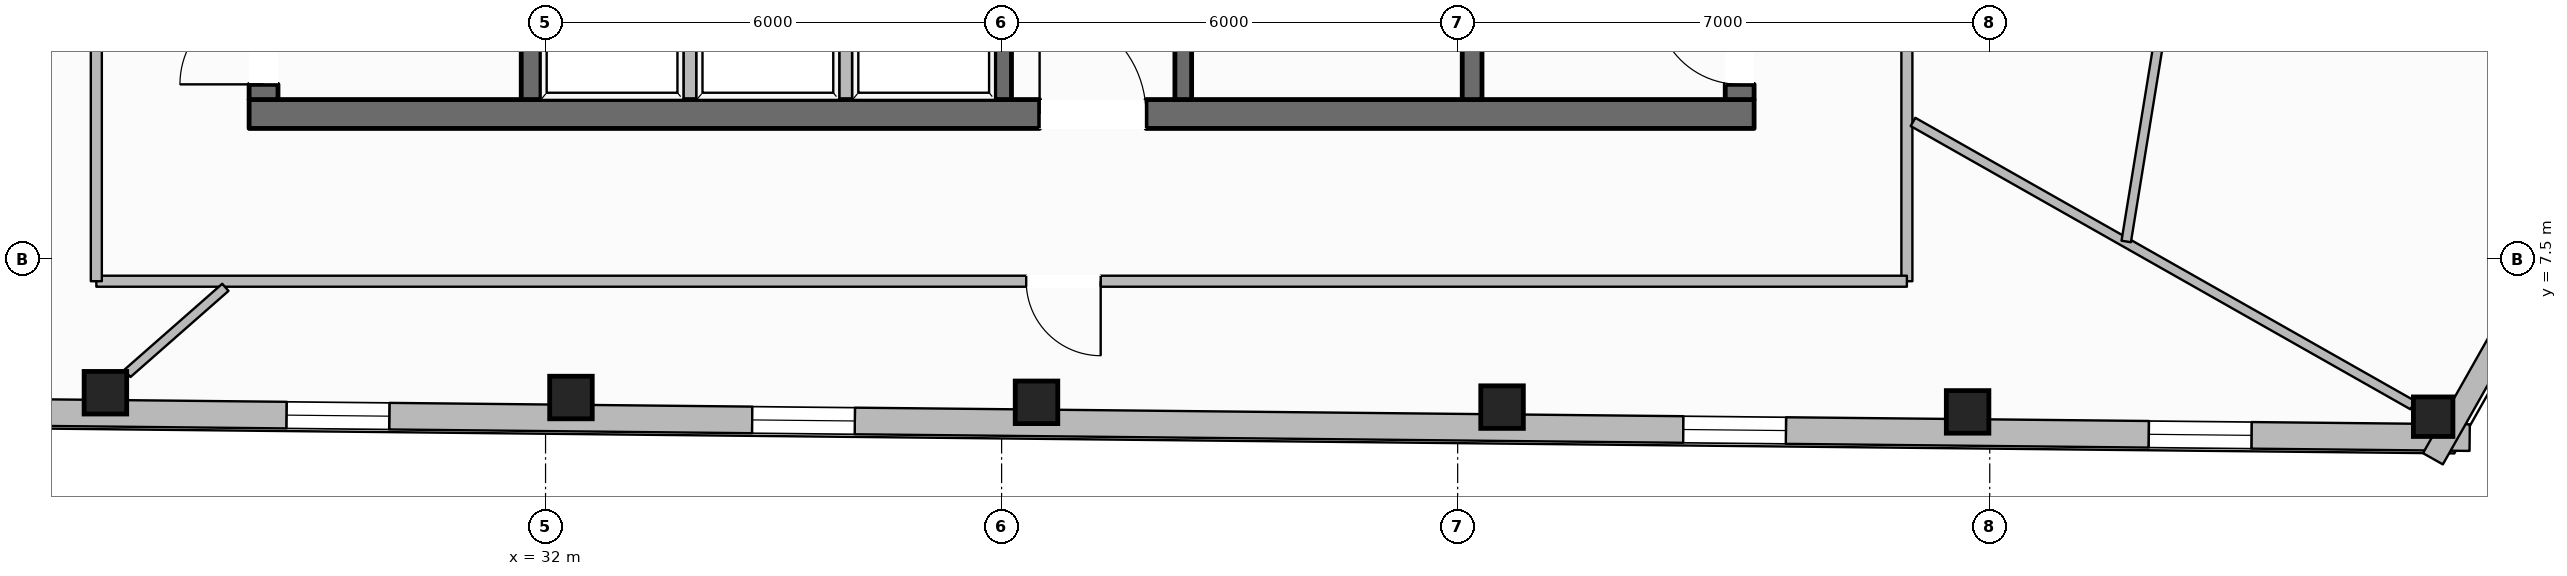
"""IFC4 building model, lengths in metres.
Left out: names, types, materials, properties, quantities, classifications, styles, units other than length and angle.
Written with IfcOpenShell. Run it as: python <this file> out.ifc"""

import sys

from ifc_helpers import new_model, si_unit, direction, frame, frame_2d, origin, origin_2d, place, context, subcontext, project, spatial, rectangle, hollow_rectangle, extrude, element, fill, save


model = new_model("IFC4")
c1 = context("Model", 3, precision=1e-05, world=origin(), true_north=direction((0.0, 1.0)))
c2 = subcontext(c1, "Body", "Model", "MODEL_VIEW")
j1 = project(units=[si_unit("LENGTHUNIT", "METRE"), si_unit("PLANEANGLEUNIT", "RADIAN")], contexts=[c1])
p1 = place(None, origin())
s1 = spatial("IfcSite", under=j1, at=p1, CompositionType="ELEMENT")
p2 = place(p1, origin())
s2 = spatial("IfcBuilding", under=s1, at=p2, CompositionType="ELEMENT")
p3 = place(p2, frame((0.0, 0.0, 247.2)))
s3 = spatial("IfcBuildingStorey", under=s2, at=p3, CompositionType="ELEMENT", Elevation=247.2)
p4 = place(p3, frame((28.1, 9.41, 0.0), z_axis=(0.0, 0.0, 1.0), x_axis=(1.0, 0.0, 0.0)))
e1 = element("IfcWall", 1, at=p4, inside=s3, PredefinedType="SOLIDWALL", context=c2, shape_type="SweptSolid", body=[
    extrude(rectangle(XDim=19.8, YDim=0.38, at=frame_2d((9.9, 0.0))), origin(), (0.0, 0.0, 1.0), 3.61),
])
p5 = place(p4, frame((10.4, 0.0, 0.0)))
e2 = element("IfcOpeningElement", 2, at=p5, cuts=e1, PredefinedType="OPENING", context=c2, shape_type="SweptSolid", body=[
    extrude(rectangle(XDim=1.4, YDim=2.2, at=frame_2d((0.7, 1.1))), frame((0.0, 0.2, 0.0), z_axis=(0.0, -1.0, 0.0), x_axis=(1.0, 0.0, 0.0)), (0.0, 0.0, 1.0), 0.4),
])
p6 = place(p3, frame((28.29, 9.6, 0.0), z_axis=(0.0, 0.0, 1.0), x_axis=(0.0, 1.0, 0.0)))
e3 = element("IfcWall", 3, at=p6, inside=s3, PredefinedType="SOLIDWALL", context=c2, shape_type="SweptSolid", body=[
    extrude(rectangle(XDim=13.0, YDim=0.38, at=frame_2d((6.5, 0.0))), origin(), (0.0, 0.0, 1.0), 3.61),
])
p7 = place(p6, frame((0.2, 0.0, 0.0)))
e4 = element("IfcOpeningElement", 4, at=p7, cuts=e3, PredefinedType="OPENING", context=c2, shape_type="SweptSolid", body=[
    extrude(rectangle(XDim=1.1, YDim=2.15, at=frame_2d((0.55, 1.075))), frame((0.0, 0.2, 0.0), z_axis=(0.0, -1.0, 0.0), x_axis=(1.0, 0.0, 0.0)), (0.0, 0.0, 1.0), 0.4),
])
p8 = place(p6, frame((8.4, 0.0, 0.0)))
e5 = element("IfcOpeningElement", 5, at=p8, cuts=e3, PredefinedType="OPENING", context=c2, shape_type="SweptSolid", body=[
    extrude(rectangle(XDim=0.9, YDim=2.1, at=frame_2d((0.45, 1.05))), frame((0.0, 0.2, 0.0), z_axis=(0.0, -1.0, 0.0), x_axis=(1.0, 0.0, 0.0)), (0.0, 0.0, 1.0), 0.4),
])
p9 = place(p3, frame((47.71, 9.6, 0.0), z_axis=(0.0, 0.0, 1.0), x_axis=(0.0, 1.0, 0.0)))
e6 = element("IfcWall", 6, at=p9, inside=s3, PredefinedType="SOLIDWALL", context=c2, shape_type="SweptSolid", body=[
    extrude(rectangle(XDim=13.0, YDim=0.38, at=frame_2d((6.5, 0.0))), origin(), (0.0, 0.0, 1.0), 3.61),
])
p10 = place(p9, frame((0.2, 0.0, 0.0)))
e7 = element("IfcOpeningElement", 7, at=p10, cuts=e6, PredefinedType="OPENING", context=c2, shape_type="SweptSolid", body=[
    extrude(rectangle(XDim=1.1, YDim=2.15, at=frame_2d((0.55, 1.075))), frame((0.0, 0.2, 0.0), z_axis=(0.0, -1.0, 0.0), x_axis=(1.0, 0.0, 0.0)), (0.0, 0.0, 1.0), 0.4),
])
p11 = place(p9, frame((8.4, 0.0, 0.0)))
e8 = element("IfcOpeningElement", 8, at=p11, cuts=e6, PredefinedType="OPENING", context=c2, shape_type="SweptSolid", body=[
    extrude(rectangle(XDim=0.9, YDim=2.1, at=frame_2d((0.45, 1.05))), frame((0.0, 0.2, 0.0), z_axis=(0.0, -1.0, 0.0), x_axis=(1.0, 0.0, 0.0)), (0.0, 0.0, 1.0), 0.4),
])
p12 = place(p3, frame((31.81, 9.6, 0.0), z_axis=(0.0, 0.0, 1.0), x_axis=(0.0, 1.0, 0.0)))
e9 = element("IfcWall", 9, at=p12, inside=s3, PredefinedType="SHEAR", context=c2, shape_type="SweptSolid", body=[
    extrude(rectangle(XDim=13.0, YDim=0.26, at=frame_2d((6.5, 0.0))), origin(), (0.0, 0.0, 1.0), 3.61),
])
p13 = place(p12, frame((10.925, 0.0, 0.0)))
e10 = element("IfcOpeningElement", 10, at=p13, cuts=e9, PredefinedType="OPENING", context=c2, shape_type="SweptSolid", body=[
    extrude(rectangle(XDim=1.25, YDim=2.25, at=frame_2d((0.625, 1.125))), frame((0.0, 0.14, 0.0), z_axis=(0.0, -1.0, 0.0), x_axis=(1.0, 0.0, 0.0)), (0.0, 0.0, 1.0), 0.28),
])
p14 = place(p3, frame((44.19, 9.6, 0.0), z_axis=(0.0, 0.0, 1.0), x_axis=(0.0, 1.0, 0.0)))
e11 = element("IfcWall", 11, at=p14, inside=s3, PredefinedType="SHEAR", context=c2, shape_type="SweptSolid", body=[
    extrude(rectangle(XDim=13.0, YDim=0.26, at=frame_2d((6.5, 0.0))), origin(), (0.0, 0.0, 1.0), 3.61),
])
p15 = place(p14, frame((10.925, 0.0, 0.0)))
e12 = element("IfcOpeningElement", 12, at=p15, cuts=e11, PredefinedType="OPENING", context=c2, shape_type="SweptSolid", body=[
    extrude(rectangle(XDim=1.25, YDim=2.25, at=frame_2d((0.625, 1.125))), frame((0.0, 0.14, 0.0), z_axis=(0.0, -1.0, 0.0), x_axis=(1.0, 0.0, 0.0)), (0.0, 0.0, 1.0), 0.28),
])
for number, where, z_axis, x_axis in (
    (13, (38.02, 9.6, 0.0), (0.0, 0.0, 1.0), (0.0, 1.0, 0.0)),
    (14, (40.39, 9.6, 0.0), (0.0, 0.0, 1.0), (0.0, 1.0, 0.0)),
):
    element("IfcWall", number, at=place(p3, frame(where, z_axis=z_axis, x_axis=x_axis)), inside=s3, PredefinedType="SOLIDWALL", context=c2, shape_type="SweptSolid", body=[
        extrude(rectangle(XDim=2.24, YDim=0.22, at=frame_2d((1.12, 0.0))), origin(), (0.0, 0.0, 1.0), 3.61),
    ])
for number, where, z_axis, x_axis in (
    (15, (26.209, 5.743, 0.0), (0.0, 0.0, 1.0), (1.0, 0.0, 0.0)),
    (16, (32.334, 5.68, 0.0), (0.0, 0.0, 1.0), (1.0, 0.0, 0.0)),
    (17, (38.459, 5.617, 0.0), (0.0, 0.0, 1.0), (1.0, 0.0, 0.0)),
    (18, (44.584, 5.554, 0.0), (0.0, 0.0, 1.0), (1.0, 0.0, 0.0)),
    (19, (50.709, 5.491, 0.0), (0.0, 0.0, 1.0), (1.0, 0.0, 0.0)),
):
    element("IfcColumn", number, at=place(p3, frame(where, z_axis=z_axis, x_axis=x_axis)), inside=s3, PredefinedType="COLUMN", context=c2, shape_type="SweptSolid", body=[
        extrude(hollow_rectangle(XDim=0.56, YDim=0.56, WallThickness=0.025, at=origin_2d()), origin(), (0.0, 0.0, 1.0), 3.61),
    ])
p16 = place(p3, frame((56.833, 5.428, 0.0), z_axis=(0.0, 0.0, 1.0), x_axis=(1.0, 0.0, 0.0)))
e20 = element("IfcColumn", 20, at=p16, inside=s3, PredefinedType="COLUMN", context=c2, shape_type="SweptSolid", body=[
    extrude(hollow_rectangle(XDim=0.52, YDim=0.52, WallThickness=0.024, at=origin_2d()), origin(), (0.0, 0.0, 1.0), 3.61),
])
p17 = place(p3, frame((57.314, 5.153, 0.0), z_axis=(0.0, 0.0, 1.0), x_axis=(-0.999946942722, 0.010301055321, 0.0)))
e21 = element("IfcWall", 21, at=p17, inside=s3, PredefinedType="STANDARD", context=c2, shape_type="SweptSolid", body=[
    extrude(rectangle(XDim=37.708, YDim=0.35, at=frame_2d((18.854, 0.0))), origin(), (0.0, 0.0, 1.0), 3.196),
])
p18 = place(p17, frame((33.497, 0.0, 0.65)))
e22 = element("IfcOpeningElement", 22, at=p18, cuts=e21, PredefinedType="OPENING", context=c2, shape_type="SweptSolid", body=[
    extrude(rectangle(XDim=1.35, YDim=1.75, at=frame_2d((0.675, 0.875))), frame((0.0, 0.185, 0.0), z_axis=(0.0, -1.0, 0.0), x_axis=(1.0, 0.0, 0.0)), (0.0, 0.0, 1.0), 0.37),
])
p19 = place(p17, frame((27.372, 0.0, 0.65)))
e23 = element("IfcOpeningElement", 23, at=p19, cuts=e21, PredefinedType="OPENING", context=c2, shape_type="SweptSolid", body=[
    extrude(rectangle(XDim=1.35, YDim=1.75, at=frame_2d((0.675, 0.875))), frame((0.0, 0.185, 0.0), z_axis=(0.0, -1.0, 0.0), x_axis=(1.0, 0.0, 0.0)), (0.0, 0.0, 1.0), 0.37),
])
p20 = place(p17, frame((21.246, 0.0, 0.65)))
e24 = element("IfcOpeningElement", 24, at=p20, cuts=e21, PredefinedType="OPENING", context=c2, shape_type="SweptSolid", body=[
    extrude(rectangle(XDim=1.35, YDim=1.75, at=frame_2d((0.675, 0.875))), frame((0.0, 0.185, 0.0), z_axis=(0.0, -1.0, 0.0), x_axis=(1.0, 0.0, 0.0)), (0.0, 0.0, 1.0), 0.37),
])
p21 = place(p17, frame((8.996, 0.0, 0.65)))
e25 = element("IfcOpeningElement", 25, at=p21, cuts=e21, PredefinedType="OPENING", context=c2, shape_type="SweptSolid", body=[
    extrude(rectangle(XDim=1.35, YDim=1.75, at=frame_2d((0.675, 0.875))), frame((0.0, 0.185, 0.0), z_axis=(0.0, -1.0, 0.0), x_axis=(1.0, 0.0, 0.0)), (0.0, 0.0, 1.0), 0.37),
])
p22 = place(p17, frame((2.871, 0.0, 0.65)))
e26 = element("IfcOpeningElement", 26, at=p22, cuts=e21, PredefinedType="OPENING", context=c2, shape_type="SweptSolid", body=[
    extrude(rectangle(XDim=1.35, YDim=1.75, at=frame_2d((0.675, 0.875))), frame((0.0, 0.185, 0.0), z_axis=(0.0, -1.0, 0.0), x_axis=(1.0, 0.0, 0.0)), (0.0, 0.0, 1.0), 0.37),
])
p23 = place(p3, frame((60.51, 11.379, 0.0), z_axis=(0.0, 0.0, 1.0), x_axis=(-0.492274685031, -0.870439908597, 0.0)))
e27 = element("IfcWall", 27, at=p23, inside=s3, PredefinedType="STANDARD", context=c2, shape_type="SweptSolid", body=[
    extrude(rectangle(XDim=7.473, YDim=0.3, at=frame_2d((3.737, 0.0))), origin(), (0.0, 0.0, 1.0), 3.196),
])
p24 = place(p23, frame((3.212, 0.0, 0.65)))
e28 = element("IfcOpeningElement", 28, at=p24, cuts=e27, PredefinedType="OPENING", context=c2, shape_type="SweptSolid", body=[
    extrude(rectangle(XDim=1.05, YDim=1.7, at=frame_2d((0.525, 0.85))), frame((0.0, 0.16, 0.0), z_axis=(0.0, -1.0, 0.0), x_axis=(1.0, 0.0, 0.0)), (0.0, 0.0, 1.0), 0.32),
])
for number, where, z_axis, x_axis in (
    (29, (33.9, 9.49, 0.0), (0.0, 0.0, 1.0), (0.0, 1.0, 0.0)),
    (30, (35.95, 9.49, 0.0), (0.0, 0.0, 1.0), (0.0, 1.0, 0.0)),
):
    element("IfcWall", number, at=place(p3, frame(where, z_axis=z_axis, x_axis=x_axis)), inside=s3, PredefinedType="PARTITIONING", context=c2, shape_type="SweptSolid", body=[
        extrude(rectangle(XDim=2.35, YDim=0.165, at=frame_2d((1.175, 0.0))), origin(), (0.0, 0.0, 1.0), 3.61),
    ])
p25 = place(p3, frame((49.91, 12.15, 0.0), z_axis=(0.0, 0.0, 1.0), x_axis=(0.0, -1.0, 0.0)))
e31 = element("IfcWall", 31, at=p25, inside=s3, PredefinedType="PARTITIONING", context=c2, shape_type="SweptSolid", body=[
    extrude(rectangle(XDim=4.94, YDim=0.145, at=frame_2d((2.47, 0.0))), origin(), (0.0, 0.0, 1.0), 3.61),
])
p26 = place(p3, frame((49.91, 7.21, 0.0), z_axis=(0.0, 0.0, 1.0), x_axis=(-1.0, 0.0, 0.0)))
e32 = element("IfcWall", 32, at=p26, inside=s3, PredefinedType="PARTITIONING", context=c2, shape_type="SweptSolid", body=[
    extrude(rectangle(XDim=23.82, YDim=0.145, at=frame_2d((11.91, 0.0))), origin(), (0.0, 0.0, 1.0), 3.61),
])
p27 = place(p26, frame((10.606, 0.0, 0.0)))
e33 = element("IfcOpeningElement", 33, at=p27, cuts=e32, PredefinedType="OPENING", context=c2, shape_type="SweptSolid", body=[
    extrude(rectangle(XDim=0.98, YDim=2.15, at=frame_2d((0.49, 1.075))), frame((0.0, 0.083, 0.0), z_axis=(0.0, -1.0, 0.0), x_axis=(1.0, 0.0, 0.0)), (0.0, 0.0, 1.0), 0.165),
])
p28 = place(p3, frame((26.09, 7.21, 0.0), z_axis=(0.0, 0.0, 1.0), x_axis=(0.0, 1.0, 0.0)))
e34 = element("IfcWall", 34, at=p28, inside=s3, PredefinedType="PARTITIONING", context=c2, shape_type="SweptSolid", body=[
    extrude(rectangle(XDim=17.78, YDim=0.145, at=frame_2d((8.89, 0.0))), origin(), (0.0, 0.0, 1.0), 3.349),
])
p29 = place(p28, frame((5.549, 0.0, 0.0)))
e35 = element("IfcOpeningElement", 35, at=p29, cuts=e34, PredefinedType="OPENING", context=c2, shape_type="SweptSolid", body=[
    extrude(rectangle(XDim=1.4, YDim=2.2, at=frame_2d((0.7, 1.1))), frame((0.0, 0.083, 0.0), z_axis=(0.0, -1.0, 0.0), x_axis=(1.0, 0.0, 0.0)), (0.0, 0.0, 1.0), 0.165),
])
p30 = place(p3, frame((27.788, 7.129, 0.0), z_axis=(0.0, 0.0, 1.0), x_axis=(-0.751333628503, -0.659922555063, 0.0)))
e36 = element("IfcWall", 36, at=p30, inside=s3, PredefinedType="PARTITIONING", context=c2, shape_type="SweptSolid", body=[
    extrude(rectangle(XDim=1.717, YDim=0.125, at=frame_2d((0.859, 0.0))), origin(), (0.0, 0.0, 1.0), 3.61),
])
p31 = place(p3, frame((49.99, 9.305, 0.0), z_axis=(0.0, 0.0, 1.0), x_axis=(0.870028652136, -0.49300116071, 0.0)))
e37 = element("IfcWall", 37, at=p31, inside=s3, PredefinedType="PARTITIONING", context=c2, shape_type="SweptSolid", body=[
    extrude(rectangle(XDim=7.557, YDim=0.125, at=frame_2d((3.779, 0.0))), origin(), (0.0, 0.0, 1.0), 3.246),
])
p32 = place(p3, frame((52.796, 7.733, 0.0), z_axis=(0.0, 0.0, 1.0), x_axis=(0.160388372881, 0.987053985274, 0.0)))
e38 = element("IfcWall", 38, at=p32, inside=s3, PredefinedType="PARTITIONING", context=c2, shape_type="SweptSolid", body=[
    extrude(rectangle(XDim=12.748, YDim=0.125, at=frame_2d((6.374, 0.0))), origin(), (0.0, 0.0, 1.0), 3.349),
])
p33 = place(p32, frame((5.995, 0.0, 0.0)))
e39 = element("IfcOpeningElement", 39, at=p33, cuts=e38, PredefinedType="OPENING", context=c2, shape_type="SweptSolid", body=[
    extrude(rectangle(XDim=0.98, YDim=2.15, at=frame_2d((0.49, 1.075))), frame((0.0, 0.073, 0.0), z_axis=(0.0, -1.0, 0.0), x_axis=(1.0, 0.0, 0.0)), (0.0, 0.0, 1.0), 0.145),
])
p34 = place(p19, origin())
e40 = element("IfcWindow", 40, at=p34, inside=s3, PartitioningType="SINGLE_PANEL", PredefinedType="WINDOW", context=c2, shape_type="SweptSolid", body=[
    extrude(rectangle(XDim=1.35, YDim=1.75, at=frame_2d((0.675, 0.875))), frame((0.0, 0.03, 0.0), z_axis=(0.0, -1.0, 0.0), x_axis=(1.0, 0.0, 0.0)), (0.0, 0.0, 1.0), 0.06),
])
fill(e23, e40)
p35 = place(p20, origin())
e41 = element("IfcWindow", 41, at=p35, inside=s3, PartitioningType="SINGLE_PANEL", PredefinedType="WINDOW", context=c2, shape_type="SweptSolid", body=[
    extrude(rectangle(XDim=1.35, YDim=1.75, at=frame_2d((0.675, 0.875))), frame((0.0, 0.03, 0.0), z_axis=(0.0, -1.0, 0.0), x_axis=(1.0, 0.0, 0.0)), (0.0, 0.0, 1.0), 0.06),
])
fill(e24, e41)
p36 = place(p21, origin())
e42 = element("IfcWindow", 42, at=p36, inside=s3, PartitioningType="SINGLE_PANEL", PredefinedType="WINDOW", context=c2, shape_type="SweptSolid", body=[
    extrude(rectangle(XDim=1.35, YDim=1.75, at=frame_2d((0.675, 0.875))), frame((0.0, 0.03, 0.0), z_axis=(0.0, -1.0, 0.0), x_axis=(1.0, 0.0, 0.0)), (0.0, 0.0, 1.0), 0.06),
])
fill(e25, e42)
p37 = place(p22, origin())
e43 = element("IfcWindow", 43, at=p37, inside=s3, PartitioningType="SINGLE_PANEL", PredefinedType="WINDOW", context=c2, shape_type="SweptSolid", body=[
    extrude(rectangle(XDim=1.35, YDim=1.75, at=frame_2d((0.675, 0.875))), frame((0.0, 0.03, 0.0), z_axis=(0.0, -1.0, 0.0), x_axis=(1.0, 0.0, 0.0)), (0.0, 0.0, 1.0), 0.06),
])
fill(e26, e43)
p38 = place(p7, origin())
e44 = element("IfcDoor", 44, at=p38, inside=s3, OperationType="SINGLE_SWING_LEFT", PredefinedType="DOOR", context=c2, shape_type="SweptSolid", body=[
    extrude(rectangle(XDim=1.1, YDim=2.15, at=frame_2d((0.55, 1.075))), frame((0.0, 0.025, 0.0), z_axis=(0.0, -1.0, 0.0), x_axis=(1.0, 0.0, 0.0)), (0.0, 0.0, 1.0), 0.05),
])
fill(e4, e44)
p39 = place(p10, origin())
e45 = element("IfcDoor", 45, at=p39, inside=s3, OperationType="SINGLE_SWING_RIGHT", PredefinedType="DOOR", context=c2, shape_type="SweptSolid", body=[
    extrude(rectangle(XDim=1.1, YDim=2.15, at=frame_2d((0.55, 1.075))), frame((0.0, 0.025, 0.0), z_axis=(0.0, -1.0, 0.0), x_axis=(1.0, 0.0, 0.0)), (0.0, 0.0, 1.0), 0.05),
])
fill(e7, e45)
p40 = place(p5, origin())
e46 = element("IfcDoor", 46, at=p40, inside=s3, OperationType="SINGLE_SWING_LEFT", PredefinedType="DOOR", context=c2, shape_type="SweptSolid", body=[
    extrude(rectangle(XDim=1.4, YDim=2.2, at=frame_2d((0.7, 1.1))), frame((0.0, 0.025, 0.0), z_axis=(0.0, -1.0, 0.0), x_axis=(1.0, 0.0, 0.0)), (0.0, 0.0, 1.0), 0.05),
])
fill(e2, e46)
p41 = place(p27, origin())
e47 = element("IfcDoor", 47, at=p41, inside=s3, OperationType="SINGLE_SWING_LEFT", PredefinedType="DOOR", context=c2, shape_type="SweptSolid", body=[
    extrude(rectangle(XDim=0.98, YDim=2.15, at=frame_2d((0.49, 1.075))), frame((0.0, 0.025, 0.0), z_axis=(0.0, -1.0, 0.0), x_axis=(1.0, 0.0, 0.0)), (0.0, 0.0, 1.0), 0.05),
])
fill(e33, e47)
save(model, sys.argv[1])
